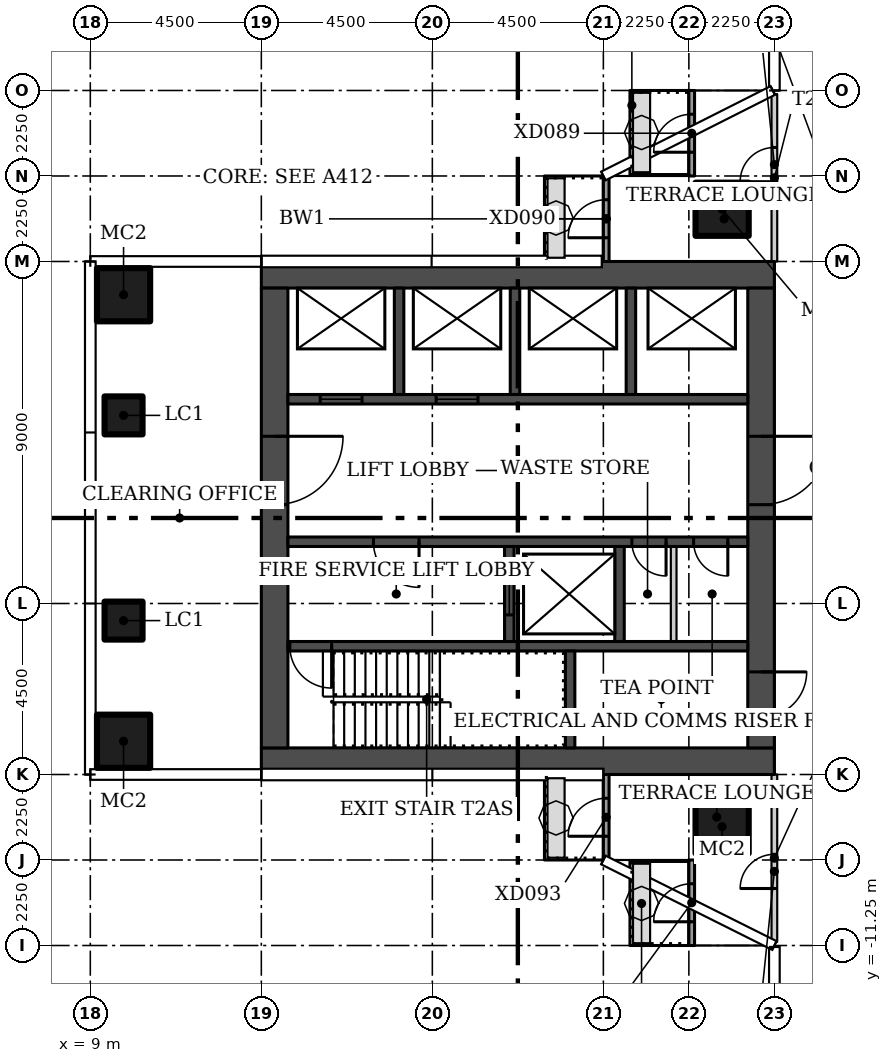
"""IFC4 building model, lengths in metres.
Left out: names, types, materials, properties, quantities, classifications, styles, units other than length and angle.
Written with IfcOpenShell. Run it as: python <this file> out.ifc"""

import sys

from ifc_helpers import new_model, si_unit, direction, frame, frame_2d, origin, origin_2d, place, context, subcontext, project, spatial, rectangle, hollow_rectangle, extrude, element, fill, save


model = new_model("IFC4")
c1 = context("Model", 3, precision=1e-05, world=origin(), true_north=direction((0.0, 1.0)))
c2 = subcontext(c1, "Body", "Model", "MODEL_VIEW")
j1 = project(units=[si_unit("LENGTHUNIT", "METRE"), si_unit("PLANEANGLEUNIT", "RADIAN")], contexts=[c1])
p1 = place(None, origin())
s1 = spatial("IfcSite", under=j1, at=p1, CompositionType="ELEMENT")
p2 = place(p1, origin())
s2 = spatial("IfcBuilding", under=s1, at=p2, CompositionType="ELEMENT")
p3 = place(p2, frame((0.0, 0.0, 69.3)))
s3 = spatial("IfcBuildingStorey", under=s2, at=p3, CompositionType="ELEMENT", Elevation=69.3)
for number, where in (
    (1, (25.625, 8.125, 0.0)),
    (2, (25.625, -8.125, 0.0)),
    (3, (9.875, -5.875, 0.0)),
    (4, (9.875, 5.875, 0.0)),
):
    element("IfcColumn", number, at=place(p3, frame(where)), inside=s3, PredefinedType="COLUMN", context=c2, shape_type="SweptSolid", body=[
        extrude(hollow_rectangle(XDim=1.4, YDim=1.4, WallThickness=0.05, at=origin_2d()), origin(), (0.0, 0.0, 1.0), 3.55),
    ])
for number, where in (
    (5, (9.875, -2.7, 0.0)),
    (6, (9.875, 2.7, 0.0)),
):
    element("IfcColumn", number, at=place(p3, frame(where)), inside=s3, PredefinedType="COLUMN", context=c2, shape_type="SweptSolid", body=[
        extrude(hollow_rectangle(XDim=1.0, YDim=1.0, WallThickness=0.04, at=origin_2d()), origin(), (0.0, 0.0, 1.0), 3.55),
    ])
p4 = place(p3, frame((27.0, 6.75, 0.0), z_axis=(0.0, 0.0, 1.0), x_axis=(0.0, 1.0, 0.0)))
e7 = element("IfcWall", 7, at=p4, inside=s3, PredefinedType="PARTITIONING", context=c2, shape_type="SweptSolid", body=[
    extrude(rectangle(XDim=4.405, YDim=0.15, at=frame_2d((2.203, 0.0))), origin(), (0.0, 0.0, 1.0), 3.55),
])
p5 = place(p4, frame((2.1, 0.0, 0.0)))
e8 = element("IfcOpeningElement", 8, at=p5, cuts=e7, PredefinedType="OPENING", context=c2, shape_type="SweptSolid", body=[
    extrude(rectangle(XDim=0.9, YDim=2.1, at=frame_2d((0.45, 1.05))), frame((0.0, 0.085, 0.0), z_axis=(0.0, -1.0, 0.0), x_axis=(1.0, 0.0, 0.0)), (0.0, 0.0, 1.0), 0.17),
])
p6 = place(p3, frame((27.0, -11.155, 0.0), z_axis=(0.0, 0.0, 1.0), x_axis=(0.0, 1.0, 0.0)))
e9 = element("IfcWall", 9, at=p6, inside=s3, PredefinedType="PARTITIONING", context=c2, shape_type="SweptSolid", body=[
    extrude(rectangle(XDim=4.405, YDim=0.15, at=frame_2d((2.203, 0.0))), origin(), (0.0, 0.0, 1.0), 3.55),
])
p7 = place(p6, frame((1.405, 0.0, 0.0)))
e10 = element("IfcOpeningElement", 10, at=p7, cuts=e9, PredefinedType="OPENING", context=c2, shape_type="SweptSolid", body=[
    extrude(rectangle(XDim=0.9, YDim=2.1, at=frame_2d((0.45, 1.05))), frame((0.0, 0.085, 0.0), z_axis=(0.0, -1.0, 0.0), x_axis=(1.0, 0.0, 0.0)), (0.0, 0.0, 1.0), 0.17),
])
p8 = place(p3, frame((24.825, 9.0, 0.0), z_axis=(0.0, 0.0, 1.0), x_axis=(0.0, 1.0, 0.0)))
e11 = element("IfcWall", 11, at=p8, inside=s3, PredefinedType="SOLIDWALL", context=c2, shape_type="SweptSolid", body=[
    extrude(rectangle(XDim=2.25, YDim=0.15, at=frame_2d((1.125, 0.0))), origin(), (0.0, 0.0, 1.0), 3.45),
])
p9 = place(p8, frame((0.625, 0.0, 0.0)))
e12 = element("IfcOpeningElement", 12, at=p9, cuts=e11, PredefinedType="OPENING", context=c2, shape_type="SweptSolid", body=[
    extrude(rectangle(XDim=1.0, YDim=2.4, at=frame_2d((0.5, 1.2))), frame((0.0, 0.085, 0.0), z_axis=(0.0, -1.0, 0.0), x_axis=(1.0, 0.0, 0.0)), (0.0, 0.0, 1.0), 0.17),
])
p10 = place(p3, frame((22.575, 6.743, 0.0), z_axis=(0.0, 0.0, 1.0), x_axis=(0.0, 1.0, 0.0)))
e13 = element("IfcWall", 13, at=p10, inside=s3, PredefinedType="SOLIDWALL", context=c2, shape_type="SweptSolid", body=[
    extrude(rectangle(XDim=2.257, YDim=0.15, at=frame_2d((1.128, 0.0))), origin(), (0.0, 0.0, 1.0), 3.45),
])
p11 = place(p10, frame((0.632, 0.0, 0.0)))
e14 = element("IfcOpeningElement", 14, at=p11, cuts=e13, PredefinedType="OPENING", context=c2, shape_type="SweptSolid", body=[
    extrude(rectangle(XDim=1.0, YDim=2.4, at=frame_2d((0.5, 1.2))), frame((0.0, 0.085, 0.0), z_axis=(0.0, -1.0, 0.0), x_axis=(1.0, 0.0, 0.0)), (0.0, 0.0, 1.0), 0.17),
])
p12 = place(p3, frame((22.575, -9.0, 0.0), z_axis=(0.0, 0.0, 1.0), x_axis=(0.0, 1.0, 0.0)))
e15 = element("IfcWall", 15, at=p12, inside=s3, PredefinedType="SOLIDWALL", context=c2, shape_type="SweptSolid", body=[
    extrude(rectangle(XDim=2.257, YDim=0.15, at=frame_2d((1.128, 0.0))), origin(), (0.0, 0.0, 1.0), 3.45),
])
p13 = place(p12, frame((0.625, 0.0, 0.0)))
e16 = element("IfcOpeningElement", 16, at=p13, cuts=e15, PredefinedType="OPENING", context=c2, shape_type="SweptSolid", body=[
    extrude(rectangle(XDim=1.0, YDim=2.4, at=frame_2d((0.5, 1.2))), frame((0.0, 0.085, 0.0), z_axis=(0.0, -1.0, 0.0), x_axis=(1.0, 0.0, 0.0)), (0.0, 0.0, 1.0), 0.17),
])
p14 = place(p3, frame((24.825, -11.25, 0.0), z_axis=(0.0, 0.0, 1.0), x_axis=(0.0, 1.0, 0.0)))
e17 = element("IfcWall", 17, at=p14, inside=s3, PredefinedType="SOLIDWALL", context=c2, shape_type="SweptSolid", body=[
    extrude(rectangle(XDim=2.25, YDim=0.15, at=frame_2d((1.125, 0.0))), origin(), (0.0, 0.0, 1.0), 3.45),
])
p15 = place(p14, frame((0.625, 0.0, 0.0)))
e18 = element("IfcOpeningElement", 18, at=p15, cuts=e17, PredefinedType="OPENING", context=c2, shape_type="SweptSolid", body=[
    extrude(rectangle(XDim=1.0, YDim=2.4, at=frame_2d((0.5, 1.2))), frame((0.0, 0.085, 0.0), z_axis=(0.0, -1.0, 0.0), x_axis=(1.0, 0.0, 0.0)), (0.0, 0.0, 1.0), 0.17),
])
for number, where in (
    (19, (13.5, -6.4, 0.0)),
    (20, (13.5, 6.4, 0.0)),
):
    element("IfcWall", number, at=place(p3, frame(where)), inside=s3, PredefinedType="SHEAR", context=c2, shape_type="SweptSolid", body=[
        extrude(rectangle(XDim=13.5, YDim=0.7, at=frame_2d((6.75, 0.0))), origin(), (0.0, 0.0, 1.0), 3.55),
    ])
p16 = place(p3, frame((13.85, 6.05, 0.0), z_axis=(0.0, 0.0, 1.0), x_axis=(0.0, -1.0, 0.0)))
e21 = element("IfcWall", 21, at=p16, inside=s3, PredefinedType="SHEAR", context=c2, shape_type="SweptSolid", body=[
    extrude(rectangle(XDim=12.1, YDim=0.7, at=frame_2d((6.05, 0.0))), origin(), (0.0, 0.0, 1.0), 3.55),
])
p17 = place(p16, frame((3.9, 0.0, 0.0)))
e22 = element("IfcOpeningElement", 22, at=p17, cuts=e21, PredefinedType="OPENING", context=c2, shape_type="SweptSolid", body=[
    extrude(rectangle(XDim=1.8, YDim=2.4, at=frame_2d((0.9, 1.2))), frame((0.0, 0.36, 0.0), z_axis=(0.0, -1.0, 0.0), x_axis=(1.0, 0.0, 0.0)), (0.0, 0.0, 1.0), 0.72),
])
p18 = place(p3, frame((26.65, 6.05, 0.0), z_axis=(0.0, 0.0, 1.0), x_axis=(0.0, -1.0, 0.0)))
e23 = element("IfcWall", 23, at=p18, inside=s3, PredefinedType="SHEAR", context=c2, shape_type="SweptSolid", body=[
    extrude(rectangle(XDim=12.1, YDim=0.7, at=frame_2d((6.05, 0.0))), origin(), (0.0, 0.0, 1.0), 3.55),
])
p19 = place(p18, frame((10.1, 0.0, 0.0)))
e24 = element("IfcOpeningElement", 24, at=p19, cuts=e23, PredefinedType="OPENING", context=c2, shape_type="SweptSolid", body=[
    extrude(rectangle(XDim=1.2, YDim=2.1, at=frame_2d((0.6, 1.05))), frame((0.0, 0.36, 0.0), z_axis=(0.0, -1.0, 0.0), x_axis=(1.0, 0.0, 0.0)), (0.0, 0.0, 1.0), 0.72),
])
p20 = place(p18, frame((3.9, 0.0, 0.0)))
e25 = element("IfcOpeningElement", 25, at=p20, cuts=e23, PredefinedType="OPENING", context=c2, shape_type="SweptSolid", body=[
    extrude(rectangle(XDim=1.8, YDim=2.4, at=frame_2d((0.9, 1.2))), frame((0.0, 0.36, 0.0), z_axis=(0.0, -1.0, 0.0), x_axis=(1.0, 0.0, 0.0)), (0.0, 0.0, 1.0), 0.72),
])
p21 = place(p3, frame((26.3, -3.375, 0.0), z_axis=(0.0, 0.0, 1.0), x_axis=(-1.0, 0.0, 0.0)))
e26 = element("IfcWall", 26, at=p21, inside=s3, PredefinedType="SHEAR", context=c2, shape_type="SweptSolid", body=[
    extrude(rectangle(XDim=12.1, YDim=0.25, at=frame_2d((6.05, 0.0))), origin(), (0.0, 0.0, 1.0), 3.55),
])
p22 = place(p21, frame((10.95, 0.0, 0.0)))
e27 = element("IfcOpeningElement", 27, at=p22, cuts=e26, PredefinedType="OPENING", context=c2, shape_type="SweptSolid", body=[
    extrude(rectangle(XDim=1.1, YDim=2.1, at=frame_2d((0.55, 1.05))), frame((0.0, 0.135, 0.0), z_axis=(0.0, -1.0, 0.0), x_axis=(1.0, 0.0, 0.0)), (0.0, 0.0, 1.0), 0.27),
])
p23 = place(p3, frame((21.625, -6.05, 0.0), z_axis=(0.0, 0.0, 1.0), x_axis=(0.0, 1.0, 0.0)))
e28 = element("IfcWall", 28, at=p23, inside=s3, PredefinedType="SHEAR", context=c2, shape_type="SweptSolid", body=[
    extrude(rectangle(XDim=2.55, YDim=0.25, at=frame_2d((1.275, 0.0))), origin(), (0.0, 0.0, 1.0), 3.55),
])
p24 = place(p3, frame((26.3, -0.625, 0.0), z_axis=(0.0, 0.0, 1.0), x_axis=(-1.0, 0.0, 0.0)))
e29 = element("IfcWall", 29, at=p24, inside=s3, PredefinedType="SHEAR", context=c2, shape_type="SweptSolid", body=[
    extrude(rectangle(XDim=12.1, YDim=0.25, at=frame_2d((6.05, 0.0))), origin(), (0.0, 0.0, 1.0), 3.55),
])
p25 = place(p24, frame((8.65, 0.0, 0.0)))
e30 = element("IfcOpeningElement", 30, at=p25, cuts=e29, PredefinedType="OPENING", context=c2, shape_type="SweptSolid", body=[
    extrude(rectangle(XDim=1.2, YDim=2.1, at=frame_2d((0.6, 1.05))), frame((0.0, 0.135, 0.0), z_axis=(0.0, -1.0, 0.0), x_axis=(1.0, 0.0, 0.0)), (0.0, 0.0, 1.0), 0.27),
])
p26 = place(p24, frame((2.15, 0.0, 0.0)))
e31 = element("IfcOpeningElement", 31, at=p26, cuts=e29, PredefinedType="OPENING", context=c2, shape_type="SweptSolid", body=[
    extrude(rectangle(XDim=0.9, YDim=2.1, at=frame_2d((0.45, 1.05))), frame((0.0, 0.135, 0.0), z_axis=(0.0, -1.0, 0.0), x_axis=(1.0, 0.0, 0.0)), (0.0, 0.0, 1.0), 0.27),
])
p27 = place(p24, frame((0.525, 0.0, 0.0)))
e32 = element("IfcOpeningElement", 32, at=p27, cuts=e29, PredefinedType="OPENING", context=c2, shape_type="SweptSolid", body=[
    extrude(rectangle(XDim=0.9, YDim=2.1, at=frame_2d((0.45, 1.05))), frame((0.0, 0.135, 0.0), z_axis=(0.0, -1.0, 0.0), x_axis=(1.0, 0.0, 0.0)), (0.0, 0.0, 1.0), 0.27),
])
p28 = place(p3, frame((20.025, -3.25, 0.0), z_axis=(0.0, 0.0, 1.0), x_axis=(0.0, 1.0, 0.0)))
e33 = element("IfcWall", 33, at=p28, inside=s3, PredefinedType="SHEAR", context=c2, shape_type="SweptSolid", body=[
    extrude(rectangle(XDim=2.5, YDim=0.25, at=frame_2d((1.25, 0.0))), origin(), (0.0, 0.0, 1.0), 3.55),
])
p29 = place(p28, frame((0.7, 0.0, 0.0)))
e34 = element("IfcOpeningElement", 34, at=p29, cuts=e33, PredefinedType="OPENING", context=c2, shape_type="SweptSolid", body=[
    extrude(rectangle(XDim=1.1, YDim=2.1, at=frame_2d((0.55, 1.05))), frame((0.0, 0.135, 0.0), z_axis=(0.0, -1.0, 0.0), x_axis=(1.0, 0.0, 0.0)), (0.0, 0.0, 1.0), 0.27),
])
p30 = place(p3, frame((22.925, -3.25, 0.0), z_axis=(0.0, 0.0, 1.0), x_axis=(0.0, 1.0, 0.0)))
e35 = element("IfcWall", 35, at=p30, inside=s3, PredefinedType="SHEAR", context=c2, shape_type="SweptSolid", body=[
    extrude(rectangle(XDim=2.5, YDim=0.25, at=frame_2d((1.25, 0.0))), origin(), (0.0, 0.0, 1.0), 3.55),
])
p31 = place(p3, frame((24.35, -3.25, 0.0), z_axis=(0.0, 0.0, 1.0), x_axis=(0.0, 1.0, 0.0)))
e36 = element("IfcWall", 36, at=p31, inside=s3, PredefinedType="PARTITIONING", context=c2, shape_type="SweptSolid", body=[
    extrude(rectangle(XDim=2.5, YDim=0.15, at=frame_2d((1.25, 0.0))), origin(), (0.0, 0.0, 1.0), 3.55),
])
p32 = place(p3, frame((14.2, 3.125, 0.0)))
e37 = element("IfcWall", 37, at=p32, inside=s3, PredefinedType="SHEAR", context=c2, shape_type="SweptSolid", body=[
    extrude(rectangle(XDim=12.1, YDim=0.25, at=frame_2d((6.05, 0.0))), origin(), (0.0, 0.0, 1.0), 3.55),
])
p33 = place(p32, frame((0.85, 0.0, 0.0)))
e38 = element("IfcOpeningElement", 38, at=p33, cuts=e37, PredefinedType="OPENING", context=c2, shape_type="SweptSolid", body=[
    extrude(rectangle(XDim=1.1, YDim=2.1, at=frame_2d((0.55, 1.05))), frame((0.0, 0.135, 0.0), z_axis=(0.0, -1.0, 0.0), x_axis=(1.0, 0.0, 0.0)), (0.0, 0.0, 1.0), 0.27),
])
p34 = place(p32, frame((3.9, 0.0, 0.0)))
e39 = element("IfcOpeningElement", 39, at=p34, cuts=e37, PredefinedType="OPENING", context=c2, shape_type="SweptSolid", body=[
    extrude(rectangle(XDim=1.1, YDim=2.1, at=frame_2d((0.55, 1.05))), frame((0.0, 0.135, 0.0), z_axis=(0.0, -1.0, 0.0), x_axis=(1.0, 0.0, 0.0)), (0.0, 0.0, 1.0), 0.27),
])
for number, where, z_axis, x_axis in (
    (40, (17.125, 3.25, 0.0), (0.0, 0.0, 1.0), (0.0, 1.0, 0.0)),
    (41, (20.175, 3.25, 0.0), (0.0, 0.0, 1.0), (0.0, 1.0, 0.0)),
    (42, (23.225, 3.25, 0.0), (0.0, 0.0, 1.0), (0.0, 1.0, 0.0)),
):
    element("IfcWall", number, at=place(p3, frame(where, z_axis=z_axis, x_axis=x_axis)), inside=s3, PredefinedType="SHEAR", context=c2, shape_type="SweptSolid", body=[
        extrude(rectangle(XDim=2.8, YDim=0.25, at=frame_2d((1.4, 0.0))), origin(), (0.0, 0.0, 1.0), 3.55),
    ])
p35 = place(p7, origin())
e43 = element("IfcDoor", 43, at=p35, inside=s3, OperationType="SINGLE_SWING_LEFT", PredefinedType="DOOR", context=c2, shape_type="SweptSolid", body=[
    extrude(rectangle(XDim=0.9, YDim=2.1, at=frame_2d((0.45, 1.05))), frame((0.0, 0.025, 0.0), z_axis=(0.0, -1.0, 0.0), x_axis=(1.0, 0.0, 0.0)), (0.0, 0.0, 1.0), 0.05),
])
fill(e10, e43)
p36 = place(p5, origin())
e44 = element("IfcDoor", 44, at=p36, inside=s3, OperationType="SINGLE_SWING_RIGHT", PredefinedType="DOOR", context=c2, shape_type="SweptSolid", body=[
    extrude(rectangle(XDim=0.9, YDim=2.1, at=frame_2d((0.45, 1.05))), frame((0.0, 0.025, 0.0), z_axis=(0.0, -1.0, 0.0), x_axis=(1.0, 0.0, 0.0)), (0.0, 0.0, 1.0), 0.05),
])
fill(e8, e44)
p37 = place(p9, origin())
e45 = element("IfcDoor", 45, at=p37, inside=s3, OperationType="SINGLE_SWING_RIGHT", PredefinedType="DOOR", context=c2, shape_type="SweptSolid", body=[
    extrude(rectangle(XDim=1.0, YDim=2.4, at=frame_2d((0.5, 1.2))), frame((0.0, 0.025, 0.0), z_axis=(0.0, -1.0, 0.0), x_axis=(1.0, 0.0, 0.0)), (0.0, 0.0, 1.0), 0.05),
])
fill(e12, e45)
p38 = place(p11, origin())
e46 = element("IfcDoor", 46, at=p38, inside=s3, OperationType="SINGLE_SWING_LEFT", PredefinedType="DOOR", context=c2, shape_type="SweptSolid", body=[
    extrude(rectangle(XDim=1.0, YDim=2.4, at=frame_2d((0.5, 1.2))), frame((0.0, 0.025, 0.0), z_axis=(0.0, -1.0, 0.0), x_axis=(1.0, 0.0, 0.0)), (0.0, 0.0, 1.0), 0.05),
])
fill(e14, e46)
p39 = place(p13, origin())
e47 = element("IfcDoor", 47, at=p39, inside=s3, OperationType="SINGLE_SWING_LEFT", PredefinedType="DOOR", context=c2, shape_type="SweptSolid", body=[
    extrude(rectangle(XDim=1.0, YDim=2.4, at=frame_2d((0.5, 1.2))), frame((0.0, 0.025, 0.0), z_axis=(0.0, -1.0, 0.0), x_axis=(1.0, 0.0, 0.0)), (0.0, 0.0, 1.0), 0.05),
])
fill(e16, e47)
p40 = place(p15, origin())
e48 = element("IfcDoor", 48, at=p40, inside=s3, OperationType="SINGLE_SWING_RIGHT", PredefinedType="DOOR", context=c2, shape_type="SweptSolid", body=[
    extrude(rectangle(XDim=1.0, YDim=2.4, at=frame_2d((0.5, 1.2))), frame((0.0, 0.025, 0.0), z_axis=(0.0, -1.0, 0.0), x_axis=(1.0, 0.0, 0.0)), (0.0, 0.0, 1.0), 0.05),
])
fill(e18, e48)
p41 = place(p17, origin())
e49 = element("IfcDoor", 49, at=p41, inside=s3, OperationType="DOUBLE_DOOR_SINGLE_SWING", PredefinedType="DOOR", context=c2, shape_type="SweptSolid", body=[
    extrude(rectangle(XDim=1.8, YDim=2.4, at=frame_2d((0.9, 1.2))), frame((0.0, 0.025, 0.0), z_axis=(0.0, -1.0, 0.0), x_axis=(1.0, 0.0, 0.0)), (0.0, 0.0, 1.0), 0.05),
])
fill(e22, e49)
p42 = place(p19, origin())
e50 = element("IfcDoor", 50, at=p42, inside=s3, OperationType="SINGLE_SWING_RIGHT", PredefinedType="DOOR", context=c2, shape_type="SweptSolid", body=[
    extrude(rectangle(XDim=1.2, YDim=2.1, at=frame_2d((0.6, 1.05))), frame((0.0, 0.025, 0.0), z_axis=(0.0, -1.0, 0.0), x_axis=(1.0, 0.0, 0.0)), (0.0, 0.0, 1.0), 0.05),
])
fill(e24, e50)
p43 = place(p20, origin())
e51 = element("IfcDoor", 51, at=p43, inside=s3, OperationType="DOUBLE_DOOR_SINGLE_SWING", PredefinedType="DOOR", context=c2, shape_type="SweptSolid", body=[
    extrude(rectangle(XDim=1.8, YDim=2.4, at=frame_2d((0.9, 1.2))), frame((0.0, 0.025, 0.0), z_axis=(0.0, -1.0, 0.0), x_axis=(1.0, 0.0, 0.0)), (0.0, 0.0, 1.0), 0.05),
])
fill(e25, e51)
p44 = place(p22, origin())
e52 = element("IfcDoor", 52, at=p44, inside=s3, OperationType="SINGLE_SWING_RIGHT", PredefinedType="DOOR", context=c2, shape_type="SweptSolid", body=[
    extrude(rectangle(XDim=1.1, YDim=2.1, at=frame_2d((0.55, 1.05))), frame((0.0, 0.025, 0.0), z_axis=(0.0, -1.0, 0.0), x_axis=(1.0, 0.0, 0.0)), (0.0, 0.0, 1.0), 0.05),
])
fill(e27, e52)
p45 = place(p25, origin())
e53 = element("IfcDoor", 53, at=p45, inside=s3, OperationType="SINGLE_SWING_RIGHT", PredefinedType="DOOR", context=c2, shape_type="SweptSolid", body=[
    extrude(rectangle(XDim=1.2, YDim=2.1, at=frame_2d((0.6, 1.05))), frame((0.0, 0.025, 0.0), z_axis=(0.0, -1.0, 0.0), x_axis=(1.0, 0.0, 0.0)), (0.0, 0.0, 1.0), 0.05),
])
fill(e30, e53)
p46 = place(p26, origin())
e54 = element("IfcDoor", 54, at=p46, inside=s3, OperationType="SINGLE_SWING_LEFT", PredefinedType="DOOR", context=c2, shape_type="SweptSolid", body=[
    extrude(rectangle(XDim=0.9, YDim=2.1, at=frame_2d((0.45, 1.05))), frame((0.0, 0.025, 0.0), z_axis=(0.0, -1.0, 0.0), x_axis=(1.0, 0.0, 0.0)), (0.0, 0.0, 1.0), 0.05),
])
fill(e31, e54)
p47 = place(p27, origin())
e55 = element("IfcDoor", 55, at=p47, inside=s3, OperationType="SINGLE_SWING_LEFT", PredefinedType="DOOR", context=c2, shape_type="SweptSolid", body=[
    extrude(rectangle(XDim=0.9, YDim=2.1, at=frame_2d((0.45, 1.05))), frame((0.0, 0.025, 0.0), z_axis=(0.0, -1.0, 0.0), x_axis=(1.0, 0.0, 0.0)), (0.0, 0.0, 1.0), 0.05),
])
fill(e32, e55)
p48 = place(p29, origin())
e56 = element("IfcDoor", 56, at=p48, inside=s3, OperationType="SLIDING_TO_LEFT", PredefinedType="DOOR", context=c2, shape_type="SweptSolid", body=[
    extrude(rectangle(XDim=1.1, YDim=2.1, at=frame_2d((0.55, 1.05))), frame((0.0, 0.025, 0.0), z_axis=(0.0, -1.0, 0.0), x_axis=(1.0, 0.0, 0.0)), (0.0, 0.0, 1.0), 0.05),
])
fill(e34, e56)
p49 = place(p33, origin())
e57 = element("IfcDoor", 57, at=p49, inside=s3, OperationType="SLIDING_TO_LEFT", PredefinedType="DOOR", context=c2, shape_type="SweptSolid", body=[
    extrude(rectangle(XDim=1.1, YDim=2.1, at=frame_2d((0.55, 1.05))), frame((0.0, 0.025, 0.0), z_axis=(0.0, -1.0, 0.0), x_axis=(1.0, 0.0, 0.0)), (0.0, 0.0, 1.0), 0.05),
])
fill(e38, e57)
p50 = place(p34, origin())
e58 = element("IfcDoor", 58, at=p50, inside=s3, OperationType="SLIDING_TO_LEFT", PredefinedType="DOOR", context=c2, shape_type="SweptSolid", body=[
    extrude(rectangle(XDim=1.1, YDim=2.1, at=frame_2d((0.55, 1.05))), frame((0.0, 0.025, 0.0), z_axis=(0.0, -1.0, 0.0), x_axis=(1.0, 0.0, 0.0)), (0.0, 0.0, 1.0), 0.05),
])
fill(e39, e58)
save(model, sys.argv[1])
